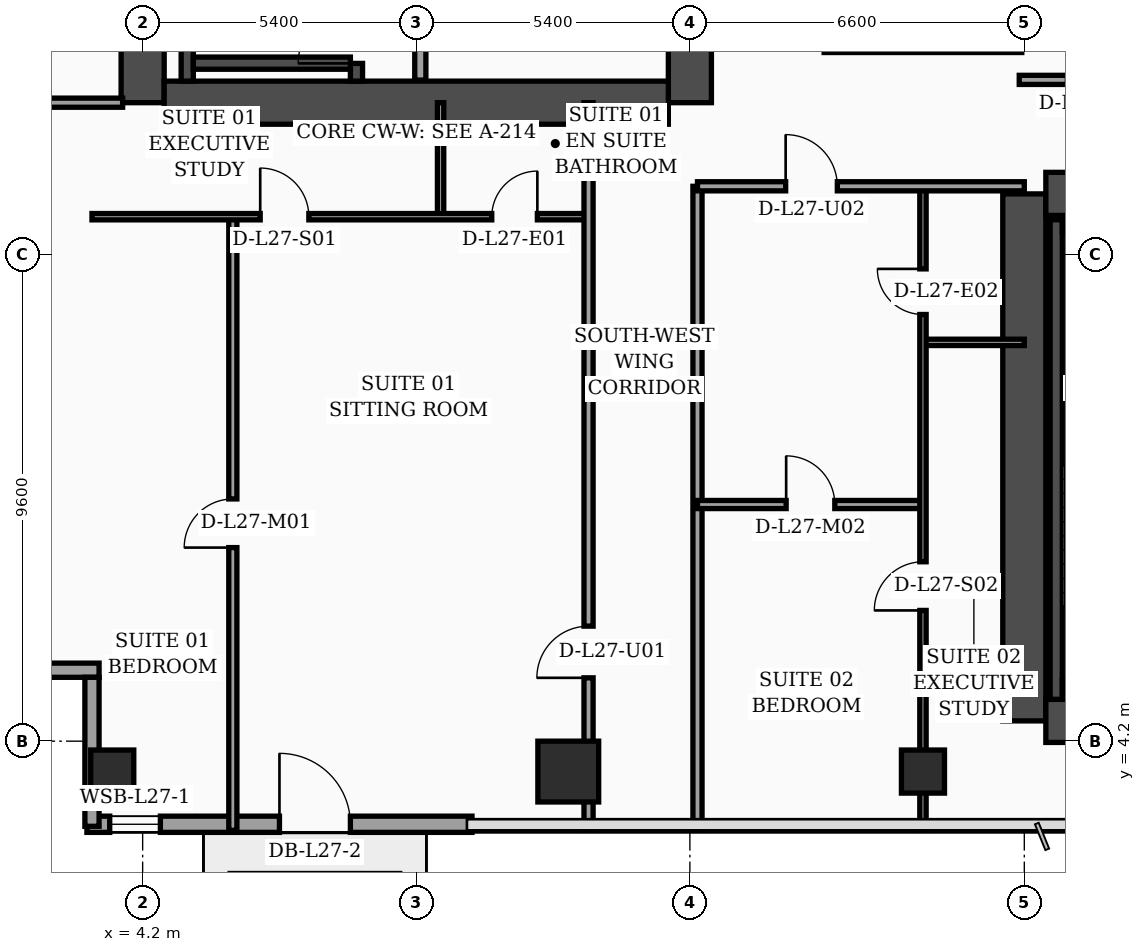
"""IFC4 building model, lengths in metres.
Left out: names, types, materials, properties, quantities, classifications, styles, units other than length and angle.
Written with IfcOpenShell. Run it as: python <this file> out.ifc"""

import sys

from ifc_helpers import new_model, si_unit, direction, frame, frame_2d, origin, origin_2d, place, context, subcontext, project, spatial, rectangle, hollow_rectangle, extrude, element, fill, save


model = new_model("IFC4")
c1 = context("Model", 3, precision=1e-05, world=origin(), true_north=direction((0.0, 1.0)))
c2 = subcontext(c1, "Body", "Model", "MODEL_VIEW")
j1 = project(units=[si_unit("LENGTHUNIT", "METRE"), si_unit("PLANEANGLEUNIT", "RADIAN")], contexts=[c1])
p1 = place(None, origin())
s1 = spatial("IfcSite", under=j1, at=p1, CompositionType="ELEMENT")
p2 = place(p1, origin())
s2 = spatial("IfcBuilding", under=s1, at=p2, CompositionType="ELEMENT")
p3 = place(p2, frame((0.0, 0.0, 112.6)))
s3 = spatial("IfcBuildingStorey", under=s2, at=p3, CompositionType="ELEMENT", Elevation=112.6)
p4 = place(p3, frame((4.2, 16.8, 0.0), z_axis=(0.0, 0.0, 1.0), x_axis=(0.0, 1.0, 0.0)))
e1 = element("IfcWall", 1, at=p4, inside=s3, PredefinedType="SHEAR", context=c2, shape_type="SweptSolid", body=[
    extrude(rectangle(XDim=21.6, YDim=0.85, at=frame_2d((10.8, 0.0))), origin(), (0.0, 0.0, 1.0), 3.56),
])
p5 = place(p3, frame((15.0, 16.8, 0.0), z_axis=(0.0, 0.0, 1.0), x_axis=(0.0, 1.0, 0.0)))
e2 = element("IfcWall", 2, at=p5, inside=s3, PredefinedType="SHEAR", context=c2, shape_type="SweptSolid", body=[
    extrude(rectangle(XDim=21.6, YDim=0.85, at=frame_2d((10.8, 0.0))), origin(), (0.0, 0.0, 1.0), 3.56),
])
p6 = place(p5, frame((8.65, 0.0, 0.0)))
e3 = element("IfcOpeningElement", 3, at=p6, cuts=e2, PredefinedType="OPENING", context=c2, shape_type="SweptSolid", body=[
    extrude(rectangle(XDim=1.1, YDim=2.2, at=frame_2d((0.55, 1.1))), frame((0.0, 0.435, 0.0), z_axis=(0.0, -1.0, 0.0), x_axis=(1.0, 0.0, 0.0)), (0.0, 0.0, 1.0), 0.87),
])
p7 = place(p5, frame((10.85, 0.0, 0.0)))
e4 = element("IfcOpeningElement", 4, at=p7, cuts=e2, PredefinedType="OPENING", context=c2, shape_type="SweptSolid", body=[
    extrude(rectangle(XDim=1.1, YDim=2.2, at=frame_2d((0.55, 1.1))), frame((0.0, 0.435, 0.0), z_axis=(0.0, -1.0, 0.0), x_axis=(1.0, 0.0, 0.0)), (0.0, 0.0, 1.0), 0.87),
])
p8 = place(p5, frame((13.5, 0.0, 0.0)))
e5 = element("IfcOpeningElement", 5, at=p8, cuts=e2, PredefinedType="OPENING", context=c2, shape_type="SweptSolid", body=[
    extrude(rectangle(XDim=1.1, YDim=2.2, at=frame_2d((0.55, 1.1))), frame((0.0, 0.435, 0.0), z_axis=(0.0, -1.0, 0.0), x_axis=(1.0, 0.0, 0.0)), (0.0, 0.0, 1.0), 0.87),
])
p9 = place(p5, frame((16.15, 0.0, 0.0)))
e6 = element("IfcOpeningElement", 6, at=p9, cuts=e2, PredefinedType="OPENING", context=c2, shape_type="SweptSolid", body=[
    extrude(rectangle(XDim=1.1, YDim=2.2, at=frame_2d((0.55, 1.1))), frame((0.0, 0.435, 0.0), z_axis=(0.0, -1.0, 0.0), x_axis=(1.0, 0.0, 0.0)), (0.0, 0.0, 1.0), 0.87),
])
p10 = place(p3, frame((4.625, 16.8, 0.0), z_axis=(0.0, 0.0, 1.0), x_axis=(1.0, 0.0, 0.0)))
e7 = element("IfcWall", 7, at=p10, inside=s3, PredefinedType="SHEAR", context=c2, shape_type="SweptSolid", body=[
    extrude(rectangle(XDim=9.95, YDim=0.85, at=frame_2d((4.975, 0.0))), origin(), (0.0, 0.0, 1.0), 3.56),
])
p11 = place(p3, frame((21.6, 4.6, 0.0), z_axis=(0.0, 0.0, 1.0), x_axis=(0.0, 1.0, 0.0)))
e8 = element("IfcWall", 8, at=p11, inside=s3, PredefinedType="SHEAR", context=c2, shape_type="SweptSolid", body=[
    extrude(rectangle(XDim=10.4, YDim=0.85, at=frame_2d((5.2, 0.0))), origin(), (0.0, 0.0, 1.0), 3.56),
])
p12 = place(p3, frame((22.025, 15.0, 0.0), z_axis=(0.0, 0.0, 1.0), x_axis=(1.0, 0.0, 0.0)))
e9 = element("IfcWall", 9, at=p12, inside=s3, PredefinedType="SHEAR", context=c2, shape_type="SweptSolid", body=[
    extrude(rectangle(XDim=9.95, YDim=0.85, at=frame_2d((4.975, 0.0))), origin(), (0.0, 0.0, 1.0), 3.56),
])
p13 = place(p12, frame((4.88, 0.0, 0.0)))
e10 = element("IfcOpeningElement", 10, at=p13, cuts=e9, PredefinedType="OPENING", context=c2, shape_type="SweptSolid", body=[
    extrude(rectangle(XDim=1.1, YDim=2.2, at=frame_2d((0.55, 1.1))), frame((0.0, 0.435, 0.0), z_axis=(0.0, -1.0, 0.0), x_axis=(1.0, 0.0, 0.0)), (0.0, 0.0, 1.0), 0.87),
])
p14 = place(p3, frame((22.025, 4.6, 0.0), z_axis=(0.0, 0.0, 1.0), x_axis=(1.0, 0.0, 0.0)))
e11 = element("IfcWall", 11, at=p14, inside=s3, PredefinedType="SHEAR", context=c2, shape_type="SweptSolid", body=[
    extrude(rectangle(XDim=9.95, YDim=0.85, at=frame_2d((4.975, 0.0))), origin(), (0.0, 0.0, 1.0), 3.56),
])
p15 = place(p3, frame((5.08, 17.225, 0.0), z_axis=(0.0, 0.0, 1.0), x_axis=(0.0, 1.0, 0.0)))
e12 = element("IfcWall", 12, at=p15, inside=s3, PredefinedType="SOLIDWALL", context=c2, shape_type="SweptSolid", body=[
    extrude(rectangle(XDim=9.565, YDim=0.24, at=frame_2d((4.782, 0.0))), origin(), (0.0, 0.0, 1.0), 3.56),
])
p16 = place(p3, frame((8.42, 17.225, 0.0), z_axis=(0.0, 0.0, 1.0), x_axis=(0.0, 1.0, 0.0)))
e13 = element("IfcWall", 13, at=p16, inside=s3, PredefinedType="SOLIDWALL", context=c2, shape_type="SweptSolid", body=[
    extrude(rectangle(XDim=9.565, YDim=0.24, at=frame_2d((4.782, 0.0))), origin(), (0.0, 0.0, 1.0), 3.56),
])
p17 = place(p16, frame((0.35, 0.0, 0.0)))
e14 = element("IfcOpeningElement", 14, at=p17, cuts=e13, PredefinedType="OPENING", context=c2, shape_type="SweptSolid", body=[
    extrude(rectangle(XDim=1.15, YDim=2.2, at=frame_2d((0.575, 1.1))), frame((0.0, 0.13, 0.0), z_axis=(0.0, -1.0, 0.0), x_axis=(1.0, 0.0, 0.0)), (0.0, 0.0, 1.0), 0.26),
])
p18 = place(p3, frame((5.2, 17.58, 0.0), z_axis=(0.0, 0.0, 1.0), x_axis=(1.0, 0.0, 0.0)))
e15 = element("IfcWall", 15, at=p18, inside=s3, PredefinedType="SOLIDWALL", context=c2, shape_type="SweptSolid", body=[
    extrude(rectangle(XDim=3.1, YDim=0.24, at=frame_2d((1.55, 0.0))), origin(), (0.0, 0.0, 1.0), 3.56),
])
p19 = place(p3, frame((22.23, 5.025, 0.0), z_axis=(0.0, 0.0, 1.0), x_axis=(0.0, 1.0, 0.0)))
e16 = element("IfcWall", 16, at=p19, inside=s3, PredefinedType="SOLIDWALL", context=c2, shape_type="SweptSolid", body=[
    extrude(rectangle(XDim=9.465, YDim=0.24, at=frame_2d((4.732, 0.0))), origin(), (0.0, 0.0, 1.0), 3.56),
])
for number, where, z_axis, x_axis in (
    (17, (22.35, 5.28, 0.0), (0.0, 0.0, 1.0), (1.0, 0.0, 0.0)),
    (18, (22.35, 14.37, 0.0), (0.0, 0.0, 1.0), (1.0, 0.0, 0.0)),
):
    element("IfcWall", number, at=place(p3, frame(where, z_axis=z_axis, x_axis=x_axis)), inside=s3, PredefinedType="SOLIDWALL", context=c2, shape_type="SweptSolid", body=[
        extrude(rectangle(XDim=3.1, YDim=0.24, at=frame_2d((1.55, 0.0))), origin(), (0.0, 0.0, 1.0), 3.56),
    ])
p20 = place(p3, frame((3.6, 3.6, 0.0), z_axis=(0.0, 0.0, 1.0), x_axis=(1.0, 0.0, 0.0)))
e19 = element("IfcColumn", 19, at=p20, inside=s3, PredefinedType="COLUMN", context=c2, shape_type="SweptSolid", body=[
    extrude(hollow_rectangle(XDim=0.85, YDim=0.85, WallThickness=0.036, at=origin_2d()), origin(), (0.0, 0.0, 1.0), 3.56),
])
p21 = place(p3, frame((12.6, 3.6, 0.0), z_axis=(0.0, 0.0, 1.0), x_axis=(1.0, 0.0, 0.0)))
e20 = element("IfcColumn", 20, at=p21, inside=s3, PredefinedType="COLUMN", context=c2, shape_type="SweptSolid", body=[
    extrude(rectangle(XDim=1.2, YDim=1.2, at=origin_2d()), origin(), (0.0, 0.0, 1.0), 3.56),
])
p22 = place(p3, frame((19.6, 3.6, 0.0), z_axis=(0.0, 0.0, 1.0), x_axis=(1.0, 0.0, 0.0)))
e21 = element("IfcColumn", 21, at=p22, inside=s3, PredefinedType="COLUMN", context=c2, shape_type="SweptSolid", body=[
    extrude(hollow_rectangle(XDim=0.85, YDim=0.85, WallThickness=0.036, at=origin_2d()), origin(), (0.0, 0.0, 1.0), 3.56),
])
p23 = place(p3, frame((3.1, 2.56, 0.0), z_axis=(0.0, 0.0, 1.0), x_axis=(1.0, 0.0, 0.0)))
e22 = element("IfcWall", 22, at=p23, inside=s3, PredefinedType="SOLIDWALL", context=c2, shape_type="SweptSolid", body=[
    extrude(rectangle(XDim=7.6, YDim=0.32, at=frame_2d((3.8, 0.0))), origin(), (0.0, 0.0, 1.0), 3.56),
])
p24 = place(p23, frame((0.45, 0.0, 0.75)))
e23 = element("IfcOpeningElement", 23, at=p24, cuts=e22, PredefinedType="OPENING", context=c2, shape_type="SweptSolid", body=[
    extrude(rectangle(XDim=1.0, YDim=1.6, at=frame_2d((0.5, 0.8))), frame((0.0, 0.17, 0.0), z_axis=(0.0, -1.0, 0.0), x_axis=(1.0, 0.0, 0.0)), (0.0, 0.0, 1.0), 0.34),
])
p25 = place(p23, frame((3.8, 0.0, 0.0)))
e24 = element("IfcOpeningElement", 24, at=p25, cuts=e22, PredefinedType="OPENING", context=c2, shape_type="SweptSolid", body=[
    extrude(rectangle(XDim=1.4, YDim=2.25, at=frame_2d((0.7, 1.125))), frame((0.0, 0.17, 0.0), z_axis=(0.0, -1.0, 0.0), x_axis=(1.0, 0.0, 0.0)), (0.0, 0.0, 1.0), 0.34),
])
p26 = place(p3, frame((0.12, 5.6, 0.0), z_axis=(0.0, 0.0, 1.0), x_axis=(1.0, 0.0, 0.0)))
e25 = element("IfcWall", 25, at=p26, inside=s3, PredefinedType="SOLIDWALL", context=c2, shape_type="SweptSolid", body=[
    extrude(rectangle(XDim=3.22, YDim=0.28, at=frame_2d((1.61, 0.0))), origin(), (0.0, 0.0, 1.0), 2.84),
])
p27 = place(p3, frame((3.2, 5.46, 0.0), z_axis=(0.0, 0.0, 1.0), x_axis=(0.0, -1.0, 0.0)))
e26 = element("IfcWall", 26, at=p27, inside=s3, PredefinedType="SOLIDWALL", context=c2, shape_type="SweptSolid", body=[
    extrude(rectangle(XDim=2.94, YDim=0.28, at=frame_2d((1.47, 0.0))), origin(), (0.0, 0.0, 1.0), 2.84),
])
p28 = place(p3, frame((9.68, 17.245, 0.0), z_axis=(0.0, 0.0, 1.0), x_axis=(0.0, 1.0, 0.0)))
e27 = element("IfcWall", 27, at=p28, inside=s3, PredefinedType="SOLIDWALL", context=c2, shape_type="SweptSolid", body=[
    extrude(rectangle(XDim=7.755, YDim=0.22, at=frame_2d((3.877, 0.0))), origin(), (0.0, 0.0, 1.0), 3.56),
])
p29 = place(p3, frame((0.08, 16.8, 0.0), z_axis=(0.0, 0.0, 1.0), x_axis=(1.0, 0.0, 0.0)))
e28 = element("IfcWall", 28, at=p29, inside=s3, PredefinedType="PARTITIONING", context=c2, shape_type="SweptSolid", body=[
    extrude(rectangle(XDim=3.725, YDim=0.18, at=frame_2d((1.862, 0.0))), origin(), (0.0, 0.0, 1.0), 2.84),
])
p30 = place(p3, frame((10.08, 14.55, 0.0), z_axis=(0.0, 0.0, 1.0), x_axis=(0.0, 1.0, 0.0)))
e29 = element("IfcWall", 29, at=p30, inside=s3, PredefinedType="PARTITIONING", context=c2, shape_type="SweptSolid", body=[
    extrude(rectangle(XDim=2.25, YDim=0.125, at=frame_2d((1.125, 0.0))), origin(), (0.0, 0.0, 1.0), 3.56),
])
p31 = place(p3, frame((5.98, 2.44, 0.0), z_axis=(0.0, 0.0, 1.0), x_axis=(0.0, 1.0, 0.0)))
e30 = element("IfcWall", 30, at=p31, inside=s3, PredefinedType="PARTITIONING", context=c2, shape_type="SweptSolid", body=[
    extrude(rectangle(XDim=12.11, YDim=0.16, at=frame_2d((6.055, 0.0))), origin(), (0.0, 0.0, 1.0), 3.04),
])
p32 = place(p31, frame((5.58, 0.0, 0.0)))
e31 = element("IfcOpeningElement", 31, at=p32, cuts=e30, PredefinedType="OPENING", context=c2, shape_type="SweptSolid", body=[
    extrude(rectangle(XDim=0.96, YDim=2.2, at=frame_2d((0.48, 1.1))), frame((0.0, 0.09, 0.0), z_axis=(0.0, -1.0, 0.0), x_axis=(1.0, 0.0, 0.0)), (0.0, 0.0, 1.0), 0.18),
])
p33 = place(p3, frame((3.2, 14.55, 0.0), z_axis=(0.0, 0.0, 1.0), x_axis=(1.0, 0.0, 0.0)))
e32 = element("IfcWall", 32, at=p33, inside=s3, PredefinedType="PARTITIONING", context=c2, shape_type="SweptSolid", body=[
    extrude(rectangle(XDim=9.8, YDim=0.125, at=frame_2d((4.9, 0.0))), origin(), (0.0, 0.0, 1.0), 2.84),
])
p34 = place(p33, frame((3.32, 0.0, 0.0)))
e33 = element("IfcOpeningElement", 33, at=p34, cuts=e32, PredefinedType="OPENING", context=c2, shape_type="SweptSolid", body=[
    extrude(rectangle(XDim=0.96, YDim=2.2, at=frame_2d((0.48, 1.1))), frame((0.0, 0.073, 0.0), z_axis=(0.0, -1.0, 0.0), x_axis=(1.0, 0.0, 0.0)), (0.0, 0.0, 1.0), 0.145),
])
p35 = place(p33, frame((7.89, 0.0, 0.0)))
e34 = element("IfcOpeningElement", 34, at=p35, cuts=e32, PredefinedType="OPENING", context=c2, shape_type="SweptSolid", body=[
    extrude(rectangle(XDim=0.9, YDim=2.15, at=frame_2d((0.45, 1.075))), frame((0.0, 0.073, 0.0), z_axis=(0.0, -1.0, 0.0), x_axis=(1.0, 0.0, 0.0)), (0.0, 0.0, 1.0), 0.145),
])
p36 = place(p3, frame((13.0, 2.44, 0.0), z_axis=(0.0, 0.0, 1.0), x_axis=(0.0, 1.0, 0.0)))
e35 = element("IfcWall", 35, at=p36, inside=s3, PredefinedType="PARTITIONING", context=c2, shape_type="SweptSolid", body=[
    extrude(rectangle(XDim=14.36, YDim=0.18, at=frame_2d((7.18, 0.0))), origin(), (0.0, 0.0, 1.0), 2.84),
])
p37 = place(p36, frame((3.01, 0.0, 0.0)))
e36 = element("IfcOpeningElement", 36, at=p37, cuts=e35, PredefinedType="OPENING", context=c2, shape_type="SweptSolid", body=[
    extrude(rectangle(XDim=1.02, YDim=2.2, at=frame_2d((0.51, 1.1))), frame((0.0, 0.1, 0.0), z_axis=(0.0, -1.0, 0.0), x_axis=(1.0, 0.0, 0.0)), (0.0, 0.0, 1.0), 0.2),
])
p38 = place(p3, frame((15.15, 2.44, 0.0), z_axis=(0.0, 0.0, 1.0), x_axis=(0.0, 1.0, 0.0)))
e37 = element("IfcWall", 37, at=p38, inside=s3, PredefinedType="PARTITIONING", context=c2, shape_type="SweptSolid", body=[
    extrude(rectangle(XDim=12.71, YDim=0.18, at=frame_2d((6.355, 0.0))), origin(), (0.0, 0.0, 1.0), 3.04),
])
p39 = place(p3, frame((19.6, 12.07, 0.0), z_axis=(0.0, 0.0, 1.0), x_axis=(1.0, 0.0, 0.0)))
e38 = element("IfcWall", 38, at=p39, inside=s3, PredefinedType="PARTITIONING", context=c2, shape_type="SweptSolid", body=[
    extrude(rectangle(XDim=2.0, YDim=0.125, at=frame_2d((1.0, 0.0))), origin(), (0.0, 0.0, 1.0), 3.56),
])
p40 = place(p3, frame((15.15, 8.87, 0.0), z_axis=(0.0, 0.0, 1.0), x_axis=(1.0, 0.0, 0.0)))
e39 = element("IfcWall", 39, at=p40, inside=s3, PredefinedType="PARTITIONING", context=c2, shape_type="SweptSolid", body=[
    extrude(rectangle(XDim=4.45, YDim=0.16, at=frame_2d((2.225, 0.0))), origin(), (0.0, 0.0, 1.0), 3.56),
])
p41 = place(p40, frame((1.75, 0.0, 0.0)))
e40 = element("IfcOpeningElement", 40, at=p41, cuts=e39, PredefinedType="OPENING", context=c2, shape_type="SweptSolid", body=[
    extrude(rectangle(XDim=0.96, YDim=2.2, at=frame_2d((0.48, 1.1))), frame((0.0, 0.09, 0.0), z_axis=(0.0, -1.0, 0.0), x_axis=(1.0, 0.0, 0.0)), (0.0, 0.0, 1.0), 0.18),
])
p42 = place(p3, frame((19.6, 2.44, 0.0), z_axis=(0.0, 0.0, 1.0), x_axis=(0.0, 1.0, 0.0)))
e41 = element("IfcWall", 41, at=p42, inside=s3, PredefinedType="PARTITIONING", context=c2, shape_type="SweptSolid", body=[
    extrude(rectangle(XDim=12.71, YDim=0.125, at=frame_2d((6.355, 0.0))), origin(), (0.0, 0.0, 1.0), 2.49),
])
p43 = place(p42, frame((4.34, 0.0, 0.0)))
e42 = element("IfcOpeningElement", 42, at=p43, cuts=e41, PredefinedType="OPENING", context=c2, shape_type="SweptSolid", body=[
    extrude(rectangle(XDim=0.96, YDim=2.2, at=frame_2d((0.48, 1.1))), frame((0.0, 0.073, 0.0), z_axis=(0.0, -1.0, 0.0), x_axis=(1.0, 0.0, 0.0)), (0.0, 0.0, 1.0), 0.145),
])
p44 = place(p42, frame((10.18, 0.0, 0.0)))
e43 = element("IfcOpeningElement", 43, at=p44, cuts=e41, PredefinedType="OPENING", context=c2, shape_type="SweptSolid", body=[
    extrude(rectangle(XDim=0.9, YDim=2.15, at=frame_2d((0.45, 1.075))), frame((0.0, 0.073, 0.0), z_axis=(0.0, -1.0, 0.0), x_axis=(1.0, 0.0, 0.0)), (0.0, 0.0, 1.0), 0.145),
])
p45 = place(p3, frame((15.15, 15.15, 0.0), z_axis=(0.0, 0.0, 1.0), x_axis=(1.0, 0.0, 0.0)))
e44 = element("IfcWall", 44, at=p45, inside=s3, PredefinedType="PARTITIONING", context=c2, shape_type="SweptSolid", body=[
    extrude(rectangle(XDim=6.45, YDim=0.18, at=frame_2d((3.225, 0.0))), origin(), (0.0, 0.0, 1.0), 2.49),
])
p46 = place(p45, frame((1.74, 0.0, 0.0)))
e45 = element("IfcOpeningElement", 45, at=p46, cuts=e44, PredefinedType="OPENING", context=c2, shape_type="SweptSolid", body=[
    extrude(rectangle(XDim=1.02, YDim=2.2, at=frame_2d((0.51, 1.1))), frame((0.0, 0.1, 0.0), z_axis=(0.0, -1.0, 0.0), x_axis=(1.0, 0.0, 0.0)), (0.0, 0.0, 1.0), 0.2),
])
p47 = place(p3, frame((17.65, 17.88, 0.0), z_axis=(0.0, 0.0, 1.0), x_axis=(1.0, 0.0, 0.0)))
e46 = element("IfcWall", 46, at=p47, inside=s3, PredefinedType="PARTITIONING", context=c2, shape_type="SweptSolid", body=[
    extrude(rectangle(XDim=3.9, YDim=0.18, at=frame_2d((1.95, 0.0))), origin(), (0.0, 0.0, 1.0), 3.56),
])
p48 = place(p3, frame((21.5, 17.25, 0.0), z_axis=(0.0, 0.0, 1.0), x_axis=(1.0, 0.0, 0.0)))
e47 = element("IfcWall", 47, at=p48, inside=s3, PredefinedType="PARTITIONING", context=c2, shape_type="SweptSolid", body=[
    extrude(rectangle(XDim=15.75, YDim=0.18, at=frame_2d((7.875, 0.0))), origin(), (0.0, 0.0, 1.0), 2.84),
])
p49 = place(p48, frame((0.95, 0.0, 0.0)))
e48 = element("IfcOpeningElement", 48, at=p49, cuts=e47, PredefinedType="OPENING", context=c2, shape_type="SweptSolid", body=[
    extrude(rectangle(XDim=1.02, YDim=2.2, at=frame_2d((0.51, 1.1))), frame((0.0, 0.1, 0.0), z_axis=(0.0, -1.0, 0.0), x_axis=(1.0, 0.0, 0.0)), (0.0, 0.0, 1.0), 0.2),
])
p50 = place(p48, frame((6.82, 0.0, 0.0)))
e49 = element("IfcOpeningElement", 49, at=p50, cuts=e47, PredefinedType="OPENING", context=c2, shape_type="SweptSolid", body=[
    extrude(rectangle(XDim=1.02, YDim=2.2, at=frame_2d((0.51, 1.1))), frame((0.0, 0.1, 0.0), z_axis=(0.0, -1.0, 0.0), x_axis=(1.0, 0.0, 0.0)), (0.0, 0.0, 1.0), 0.2),
])
p51 = place(p48, frame((11.38, 0.0, 0.0)))
e50 = element("IfcOpeningElement", 50, at=p51, cuts=e47, PredefinedType="OPENING", context=c2, shape_type="SweptSolid", body=[
    extrude(rectangle(XDim=1.02, YDim=2.2, at=frame_2d((0.51, 1.1))), frame((0.0, 0.1, 0.0), z_axis=(0.0, -1.0, 0.0), x_axis=(1.0, 0.0, 0.0)), (0.0, 0.0, 1.0), 0.2),
])
p52 = place(p24, origin())
e51 = element("IfcWindow", 51, at=p52, inside=s3, PartitioningType="SINGLE_PANEL", PredefinedType="WINDOW", context=c2, shape_type="SweptSolid", body=[
    extrude(rectangle(XDim=1.0, YDim=1.6, at=frame_2d((0.5, 0.8))), frame((0.0, 0.03, 0.0), z_axis=(0.0, -1.0, 0.0), x_axis=(1.0, 0.0, 0.0)), (0.0, 0.0, 1.0), 0.06),
])
fill(e23, e51)
p53 = place(p25, origin())
e52 = element("IfcDoor", 52, at=p53, inside=s3, OperationType="SINGLE_SWING_LEFT", PredefinedType="DOOR", context=c2, shape_type="SweptSolid", body=[
    extrude(rectangle(XDim=1.4, YDim=2.25, at=frame_2d((0.7, 1.125))), frame((0.0, 0.025, 0.0), z_axis=(0.0, -1.0, 0.0), x_axis=(1.0, 0.0, 0.0)), (0.0, 0.0, 1.0), 0.05),
])
fill(e24, e52)
p54 = place(p32, origin())
e53 = element("IfcDoor", 53, at=p54, inside=s3, OperationType="SINGLE_SWING_LEFT", PredefinedType="DOOR", context=c2, shape_type="SweptSolid", body=[
    extrude(rectangle(XDim=0.96, YDim=2.2, at=frame_2d((0.48, 1.1))), frame((0.0, 0.025, 0.0), z_axis=(0.0, -1.0, 0.0), x_axis=(1.0, 0.0, 0.0)), (0.0, 0.0, 1.0), 0.05),
])
fill(e31, e53)
p55 = place(p34, origin())
e54 = element("IfcDoor", 54, at=p55, inside=s3, OperationType="SINGLE_SWING_LEFT", PredefinedType="DOOR", context=c2, shape_type="SweptSolid", body=[
    extrude(rectangle(XDim=0.96, YDim=2.2, at=frame_2d((0.48, 1.1))), frame((0.0, 0.025, 0.0), z_axis=(0.0, -1.0, 0.0), x_axis=(1.0, 0.0, 0.0)), (0.0, 0.0, 1.0), 0.05),
])
fill(e33, e54)
p56 = place(p35, origin())
e55 = element("IfcDoor", 55, at=p56, inside=s3, OperationType="SINGLE_SWING_RIGHT", PredefinedType="DOOR", context=c2, shape_type="SweptSolid", body=[
    extrude(rectangle(XDim=0.9, YDim=2.15, at=frame_2d((0.45, 1.075))), frame((0.0, 0.025, 0.0), z_axis=(0.0, -1.0, 0.0), x_axis=(1.0, 0.0, 0.0)), (0.0, 0.0, 1.0), 0.05),
])
fill(e34, e55)
p57 = place(p37, origin())
e56 = element("IfcDoor", 56, at=p57, inside=s3, OperationType="SINGLE_SWING_LEFT", PredefinedType="DOOR", context=c2, shape_type="SweptSolid", body=[
    extrude(rectangle(XDim=1.02, YDim=2.2, at=frame_2d((0.51, 1.1))), frame((0.0, 0.025, 0.0), z_axis=(0.0, -1.0, 0.0), x_axis=(1.0, 0.0, 0.0)), (0.0, 0.0, 1.0), 0.05),
])
fill(e36, e56)
p58 = place(p41, origin())
e57 = element("IfcDoor", 57, at=p58, inside=s3, OperationType="SINGLE_SWING_LEFT", PredefinedType="DOOR", context=c2, shape_type="SweptSolid", body=[
    extrude(rectangle(XDim=0.96, YDim=2.2, at=frame_2d((0.48, 1.1))), frame((0.0, 0.025, 0.0), z_axis=(0.0, -1.0, 0.0), x_axis=(1.0, 0.0, 0.0)), (0.0, 0.0, 1.0), 0.05),
])
fill(e40, e57)
p59 = place(p43, origin())
e58 = element("IfcDoor", 58, at=p59, inside=s3, OperationType="SINGLE_SWING_LEFT", PredefinedType="DOOR", context=c2, shape_type="SweptSolid", body=[
    extrude(rectangle(XDim=0.96, YDim=2.2, at=frame_2d((0.48, 1.1))), frame((0.0, 0.025, 0.0), z_axis=(0.0, -1.0, 0.0), x_axis=(1.0, 0.0, 0.0)), (0.0, 0.0, 1.0), 0.05),
])
fill(e42, e58)
p60 = place(p44, origin())
e59 = element("IfcDoor", 59, at=p60, inside=s3, OperationType="SINGLE_SWING_RIGHT", PredefinedType="DOOR", context=c2, shape_type="SweptSolid", body=[
    extrude(rectangle(XDim=0.9, YDim=2.15, at=frame_2d((0.45, 1.075))), frame((0.0, 0.025, 0.0), z_axis=(0.0, -1.0, 0.0), x_axis=(1.0, 0.0, 0.0)), (0.0, 0.0, 1.0), 0.05),
])
fill(e43, e59)
p61 = place(p46, origin())
e60 = element("IfcDoor", 60, at=p61, inside=s3, OperationType="SINGLE_SWING_LEFT", PredefinedType="DOOR", context=c2, shape_type="SweptSolid", body=[
    extrude(rectangle(XDim=1.02, YDim=2.2, at=frame_2d((0.51, 1.1))), frame((0.0, 0.025, 0.0), z_axis=(0.0, -1.0, 0.0), x_axis=(1.0, 0.0, 0.0)), (0.0, 0.0, 1.0), 0.05),
])
fill(e45, e60)
p62 = place(p17, origin())
e61 = element("IfcDoor", 61, at=p62, inside=s3, OperationType="SINGLE_SWING_LEFT", PredefinedType="DOOR", context=c2, shape_type="SweptSolid", body=[
    extrude(rectangle(XDim=1.15, YDim=2.2, at=frame_2d((0.575, 1.1))), frame((0.0, 0.025, 0.0), z_axis=(0.0, -1.0, 0.0), x_axis=(1.0, 0.0, 0.0)), (0.0, 0.0, 1.0), 0.05),
])
fill(e14, e61)
save(model, sys.argv[1])
